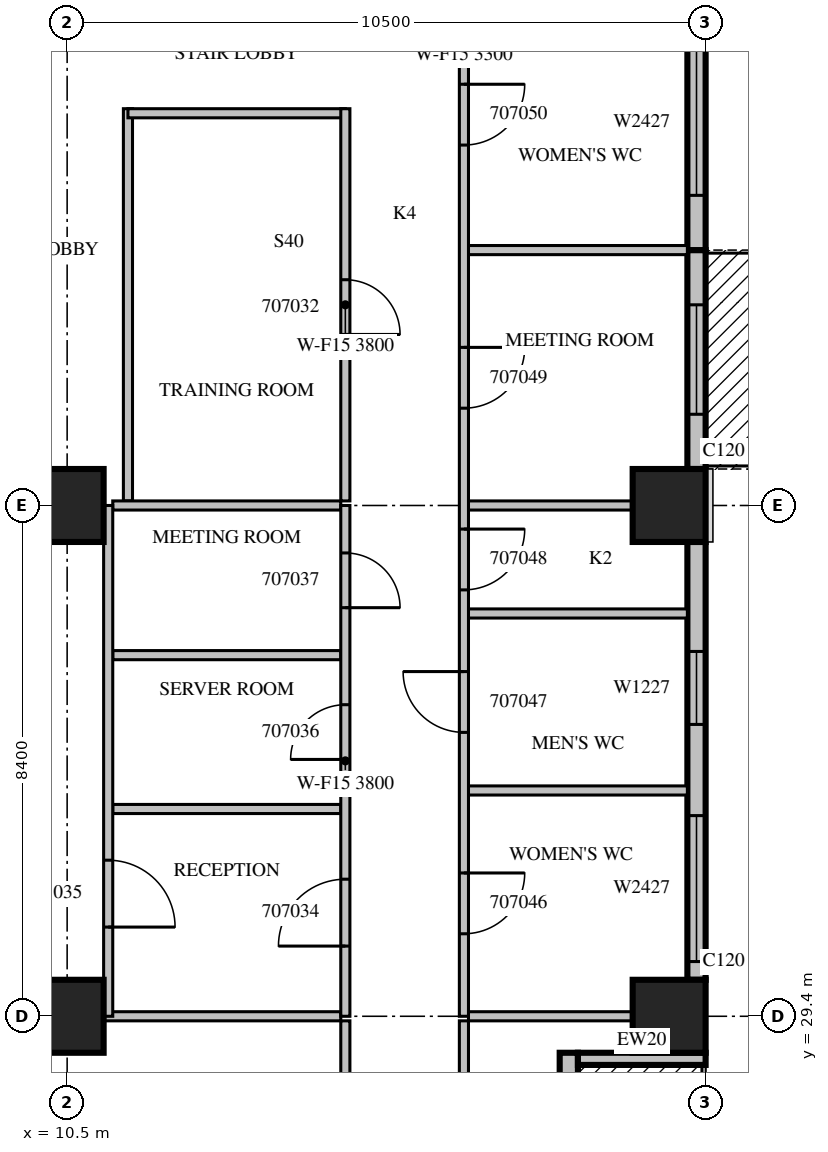
"""IFC4 building model, lengths in metres.
Left out: names, types, materials, properties, quantities, classifications, styles, units other than length and angle.
Written with IfcOpenShell. Run it as: python <this file> out.ifc"""

import sys

from ifc_helpers import new_model, si_unit, direction, frame, frame_2d, origin, origin_2d, place, context, subcontext, project, spatial, rectangle, extrude, source, transform, mapped, element, fill, save


model = new_model("IFC4")
c1 = context("Model", 3, precision=1e-05, world=origin(), true_north=direction((0.0, 1.0)))
c2 = subcontext(c1, "Body", "Model", "MODEL_VIEW")
j1 = project(units=[si_unit("LENGTHUNIT", "METRE"), si_unit("PLANEANGLEUNIT", "RADIAN")], contexts=[c1])
p1 = place(None, origin())
s1 = spatial("IfcSite", under=j1, at=p1, CompositionType="ELEMENT")
p2 = place(p1, origin())
s2 = spatial("IfcBuilding", under=s1, at=p2, CompositionType="ELEMENT")
p3 = place(p2, frame((0.0, 0.0, 40.5)))
s3 = spatial("IfcBuildingStorey", under=s2, at=p3, CompositionType="ELEMENT", Elevation=40.5)
m1 = source(origin(), c2, "Body", "SweptSolid", [
    extrude(rectangle(XDim=1.2, YDim=1.2, at=origin_2d()), origin(), (0.0, 0.0, 1.0), 4.2),
])
for number, where, z_axis, x_axis in (
    (1, (10.5, 29.4, 0.0), (0.0, 0.0, 1.0), (1.0, 0.0, 0.0)),
    (2, (20.4, 29.4, 0.0), (0.0, 0.0, 1.0), (1.0, 0.0, 0.0)),
    (3, (10.5, 37.8, 0.0), (0.0, 0.0, 1.0), (1.0, 0.0, 0.0)),
    (4, (20.4, 37.8, 0.0), (0.0, 0.0, 1.0), (1.0, 0.0, 0.0)),
):
    element("IfcColumn", number, at=place(p3, frame(where, z_axis=z_axis, x_axis=x_axis)), inside=s3, PredefinedType="COLUMN", context=c2, shape_type="MappedRepresentation", body=[
        mapped(m1, transform((0.0, 0.0, 0.0), scale=1.0)),
    ])
m2 = source(origin(), c2, "Body", "SweptSolid", [
    extrude(rectangle(XDim=3.6, YDim=0.3, at=frame_2d((1.8, 0.0))), origin(), (0.0, 0.0, 1.0), 3.8),
])
p4 = place(p3, frame((18.75, 25.2, 0.0), z_axis=(0.0, 0.0, 1.0), x_axis=(0.0, 1.0, 0.0)))
e5 = element("IfcWall", 5, at=p4, inside=s3, PredefinedType="STANDARD", context=c2, shape_type="MappedRepresentation", body=[
    mapped(m2, transform((0.0, 0.0, 0.0), scale=1.0)),
])
m3 = source(origin(), c2, "Body", "SweptSolid", [
    extrude(rectangle(XDim=1.8, YDim=2.4, at=frame_2d((0.9, 1.2))), frame((0.0, 0.16, 0.0), z_axis=(0.0, -1.0, 0.0), x_axis=(1.0, 0.0, 0.0)), (0.0, 0.0, 1.0), 0.32),
])
p5 = place(p4, frame((0.9, 0.0, 0.0)))
e6 = element("IfcOpeningElement", 6, at=p5, cuts=e5, PredefinedType="OPENING", context=c2, shape_type="MappedRepresentation", body=[
    mapped(m3, transform((0.0, 0.0, 0.0), scale=1.0)),
])
m4 = source(origin(), c2, "Body", "SweptSolid", [
    extrude(rectangle(XDim=2.1, YDim=0.2, at=frame_2d((1.05, 0.0))), origin(), (0.0, 0.0, 1.0), 3.8),
])
p6 = place(p3, frame((21.0, 28.7, 0.0), z_axis=(0.0, 0.0, 1.0), x_axis=(-1.0, 0.0, 0.0)))
e7 = element("IfcWall", 7, at=p6, inside=s3, PredefinedType="STANDARD", context=c2, shape_type="MappedRepresentation", body=[
    mapped(m4, transform((0.0, 0.0, 0.0), scale=1.0)),
])
m5 = source(origin(), c2, "Body", "SweptSolid", [
    extrude(rectangle(XDim=7.2, YDim=0.3, at=frame_2d((3.6, 0.0))), origin(), (0.0, 0.0, 1.0), 3.8),
])
p7 = place(p3, frame((20.85, 30.0, 0.0), z_axis=(0.0, 0.0, 1.0), x_axis=(0.0, 1.0, 0.0)))
e8 = element("IfcWall", 8, at=p7, inside=s3, PredefinedType="STANDARD", context=c2, shape_type="MappedRepresentation", body=[
    mapped(m5, transform((0.0, 0.0, 0.0), scale=1.0)),
])
m6 = source(origin(), c2, "Body", "SweptSolid", [
    extrude(rectangle(XDim=2.4, YDim=2.7, at=frame_2d((1.2, 1.35))), frame((0.0, 0.16, 0.0), z_axis=(0.0, -1.0, 0.0), x_axis=(1.0, 0.0, 0.0)), (0.0, 0.0, 1.0), 0.32),
])
p8 = place(p7, frame((0.3, 0.0, 0.6)))
e9 = element("IfcOpeningElement", 9, at=p8, cuts=e8, PredefinedType="OPENING", context=c2, shape_type="MappedRepresentation", body=[
    mapped(m6, transform((0.0, 0.0, 0.0), scale=1.0)),
])
m7 = source(origin(), c2, "Body", "SweptSolid", [
    extrude(rectangle(XDim=1.2, YDim=2.7, at=frame_2d((0.6, 1.35))), frame((0.0, 0.16, 0.0), z_axis=(0.0, -1.0, 0.0), x_axis=(1.0, 0.0, 0.0)), (0.0, 0.0, 1.0), 0.32),
])
p9 = place(p7, frame((4.199, 0.0, 0.6)))
e10 = element("IfcOpeningElement", 10, at=p9, cuts=e8, PredefinedType="OPENING", context=c2, shape_type="MappedRepresentation", body=[
    mapped(m7, transform((0.0, 0.0, 0.0), scale=1.0)),
])
p10 = place(p3, frame((20.85, 38.4, 0.0), z_axis=(0.0, 0.0, 1.0), x_axis=(0.0, 1.0, 0.0)))
e11 = element("IfcWall", 11, at=p10, inside=s3, PredefinedType="STANDARD", context=c2, shape_type="MappedRepresentation", body=[
    mapped(m2, transform((0.0, 0.0, 0.0), scale=1.0)),
])
p11 = place(p10, frame((0.9, 0.0, 0.0)))
e12 = element("IfcOpeningElement", 12, at=p11, cuts=e11, PredefinedType="OPENING", context=c2, shape_type="MappedRepresentation", body=[
    mapped(m3, transform((0.0, 0.0, 0.0), scale=1.0)),
])
p12 = place(p3, frame((20.85, 42.0, 0.0), z_axis=(0.0, 0.0, 1.0), x_axis=(0.0, 1.0, 0.0)))
e13 = element("IfcWall", 13, at=p12, inside=s3, PredefinedType="STANDARD", context=c2, shape_type="MappedRepresentation", body=[
    mapped(m2, transform((0.0, 0.0, 0.0), scale=1.0)),
])
p13 = place(p12, frame((0.9, 0.0, 0.6)))
e14 = element("IfcOpeningElement", 14, at=p13, cuts=e13, PredefinedType="OPENING", context=c2, shape_type="MappedRepresentation", body=[
    mapped(m6, transform((0.0, 0.0, 0.0), scale=1.0)),
])
m8 = source(origin(), c2, "Body", "SweptSolid", [
    extrude(rectangle(XDim=5.15, YDim=0.15, at=frame_2d((2.575, 0.0))), origin(), (0.0, 0.0, 1.0), 3.8),
])
for number, where, z_axis, x_axis in (
    (15, (15.075, 24.175, 0.0), (0.0, 0.0, 1.0), (0.0, 1.0, 0.0)),
    (16, (17.025, 29.325, 0.0), (0.0, 0.0, 1.0), (0.0, -1.0, 0.0)),
):
    element("IfcWall", number, at=place(p3, frame(where, z_axis=z_axis, x_axis=x_axis)), inside=s3, PredefinedType="PARTITIONING", context=c2, shape_type="MappedRepresentation", body=[
        mapped(m8, transform((0.0, 0.0, 0.0), scale=1.0)),
    ])
m9 = source(origin(), c2, "Body", "SweptSolid", [
    extrude(rectangle(XDim=3.901, YDim=0.15, at=frame_2d((1.95, 0.0))), origin(), (0.0, 0.0, 1.0), 3.8),
])
p14 = place(p3, frame((15.0, 29.4, 0.0), z_axis=(0.0, 0.0, 1.0), x_axis=(-1.0, 0.0, 0.0)))
e17 = element("IfcWall", 17, at=p14, inside=s3, PredefinedType="PARTITIONING", context=c2, shape_type="MappedRepresentation", body=[
    mapped(m9, transform((0.0, 0.0, 0.0), scale=1.0)),
])
m10 = source(origin(), c2, "Body", "SweptSolid", [
    extrude(rectangle(XDim=2.701, YDim=0.15, at=frame_2d((1.351, 0.0))), origin(), (0.0, 0.0, 1.0), 3.8),
])
p15 = place(p3, frame((19.801, 29.4, 0.0), z_axis=(0.0, 0.0, 1.0), x_axis=(-1.0, 0.0, 0.0)))
e18 = element("IfcWall", 18, at=p15, inside=s3, PredefinedType="PARTITIONING", context=c2, shape_type="MappedRepresentation", body=[
    mapped(m10, transform((0.0, 0.0, 0.0), scale=1.0)),
])
m11 = source(origin(), c2, "Body", "SweptSolid", [
    extrude(rectangle(XDim=6.45, YDim=0.15, at=frame_2d((3.225, 0.0))), origin(), (0.0, 0.0, 1.0), 3.8),
])
p16 = place(p3, frame((11.5, 44.325, 0.0), z_axis=(0.0, 0.0, 1.0), x_axis=(0.0, -1.0, 0.0)))
e19 = element("IfcWall", 19, at=p16, inside=s3, PredefinedType="PARTITIONING", context=c2, shape_type="MappedRepresentation", body=[
    mapped(m11, transform((0.0, 0.0, 0.0), scale=1.0)),
])
p17 = place(p3, frame((15.075, 44.25, 0.0), z_axis=(0.0, 0.0, 1.0), x_axis=(-1.0, 0.0, 0.0)))
e20 = element("IfcWall", 20, at=p17, inside=s3, PredefinedType="PARTITIONING", context=c2, shape_type="SweptSolid", body=[
    extrude(rectangle(XDim=3.575, YDim=0.15, at=frame_2d((1.788, 0.0))), origin(), (0.0, 0.0, 1.0), 3.8),
])
p18 = place(p3, frame((15.075, 37.875, 0.0), z_axis=(0.0, 0.0, 1.0), x_axis=(0.0, 1.0, 0.0)))
e21 = element("IfcWall", 21, at=p18, inside=s3, PredefinedType="PARTITIONING", context=c2, shape_type="MappedRepresentation", body=[
    mapped(m11, transform((0.0, 0.0, 0.0), scale=1.0)),
])
m12 = source(origin(), c2, "Body", "SweptSolid", [
    extrude(rectangle(XDim=0.9, YDim=2.1, at=frame_2d((0.45, 1.05))), frame((0.0, 0.085, 0.0), z_axis=(0.0, -1.0, 0.0), x_axis=(1.0, 0.0, 0.0)), (0.0, 0.0, 1.0), 0.17),
])
p19 = place(p18, frame((2.737, 0.0, 0.0)))
e22 = element("IfcOpeningElement", 22, at=p19, cuts=e21, PredefinedType="OPENING", context=c2, shape_type="MappedRepresentation", body=[
    mapped(m12, transform((0.0, 0.0, 0.0), scale=1.0)),
])
m13 = source(origin(), c2, "Body", "SweptSolid", [
    extrude(rectangle(XDim=3.75, YDim=0.15, at=frame_2d((1.875, 0.0))), origin(), (0.0, 0.0, 1.0), 3.8),
])
for number, where, z_axis, x_axis in (
    (23, (15.0, 32.809, 0.0), (0.0, 0.0, 1.0), (-1.0, 0.0, 0.0)),
    (24, (15.0, 35.339, 0.0), (0.0, 0.0, 1.0), (-1.0, 0.0, 0.0)),
    (25, (15.0, 37.8, 0.0), (0.0, 0.0, 1.0), (-1.0, 0.0, 0.0)),
):
    element("IfcWall", number, at=place(p3, frame(where, z_axis=z_axis, x_axis=x_axis)), inside=s3, PredefinedType="PARTITIONING", context=c2, shape_type="MappedRepresentation", body=[
        mapped(m13, transform((0.0, 0.0, 0.0), scale=1.0)),
    ])
m14 = source(origin(), c2, "Body", "SweptSolid", [
    extrude(rectangle(XDim=8.4, YDim=0.15, at=frame_2d((4.2, 0.0))), origin(), (0.0, 0.0, 1.0), 3.8),
])
p20 = place(p3, frame((11.175, 29.4, 0.0), z_axis=(0.0, 0.0, 1.0), x_axis=(0.0, 1.0, 0.0)))
e26 = element("IfcWall", 26, at=p20, inside=s3, PredefinedType="PARTITIONING", context=c2, shape_type="MappedRepresentation", body=[
    mapped(m14, transform((0.0, 0.0, 0.0), scale=1.0)),
])
m15 = source(origin(), c2, "Body", "SweptSolid", [
    extrude(rectangle(XDim=1.1, YDim=2.1, at=frame_2d((0.55, 1.05))), frame((0.0, 0.085, 0.0), z_axis=(0.0, -1.0, 0.0), x_axis=(1.0, 0.0, 0.0)), (0.0, 0.0, 1.0), 0.17),
])
p21 = place(p20, frame((1.467, 0.0, 0.0)))
e27 = element("IfcOpeningElement", 27, at=p21, cuts=e26, PredefinedType="OPENING", context=c2, shape_type="MappedRepresentation", body=[
    mapped(m15, transform((0.0, 0.0, 0.0), scale=1.0)),
])
m16 = source(origin(), c2, "Body", "SweptSolid", [
    extrude(rectangle(XDim=3.6, YDim=0.15, at=frame_2d((1.8, 0.0))), origin(), (0.0, 0.0, 1.0), 3.8),
])
for number, where, z_axis, x_axis in (
    (28, (17.1, 33.113, 0.0), (0.0, 0.0, 1.0), (1.0, 0.0, 0.0)),
    (29, (17.1, 36.024, 0.0), (0.0, 0.0, 1.0), (1.0, 0.0, 0.0)),
):
    element("IfcWall", number, at=place(p3, frame(where, z_axis=z_axis, x_axis=x_axis)), inside=s3, PredefinedType="PARTITIONING", context=c2, shape_type="MappedRepresentation", body=[
        mapped(m16, transform((0.0, 0.0, 0.0), scale=1.0)),
    ])
p22 = place(p3, frame((19.801, 37.8, 0.0), z_axis=(0.0, 0.0, 1.0), x_axis=(-1.0, 0.0, 0.0)))
e30 = element("IfcWall", 30, at=p22, inside=s3, PredefinedType="PARTITIONING", context=c2, shape_type="MappedRepresentation", body=[
    mapped(m10, transform((0.0, 0.0, 0.0), scale=1.0)),
])
p23 = place(p3, frame((20.7, 42.0, 0.0), z_axis=(0.0, 0.0, 1.0), x_axis=(-1.0, 0.0, 0.0)))
e31 = element("IfcWall", 31, at=p23, inside=s3, PredefinedType="PARTITIONING", context=c2, shape_type="MappedRepresentation", body=[
    mapped(m16, transform((0.0, 0.0, 0.0), scale=1.0)),
])
p24 = place(p3, frame((15.075, 29.4, 0.0), z_axis=(0.0, 0.0, 1.0), x_axis=(0.0, 1.0, 0.0)))
e32 = element("IfcWall", 32, at=p24, inside=s3, PredefinedType="PARTITIONING", context=c2, shape_type="MappedRepresentation", body=[
    mapped(m14, transform((0.0, 0.0, 0.0), scale=1.0)),
])
p25 = place(p24, frame((1.154, 0.0, 0.0)))
e33 = element("IfcOpeningElement", 33, at=p25, cuts=e32, PredefinedType="OPENING", context=c2, shape_type="MappedRepresentation", body=[
    mapped(m15, transform((0.0, 0.0, 0.0), scale=1.0)),
])
p26 = place(p24, frame((4.224, 0.0, 0.0)))
e34 = element("IfcOpeningElement", 34, at=p26, cuts=e32, PredefinedType="OPENING", context=c2, shape_type="MappedRepresentation", body=[
    mapped(m12, transform((0.0, 0.0, 0.0), scale=1.0)),
])
p27 = place(p24, frame((6.719, 0.0, 0.0)))
e35 = element("IfcOpeningElement", 35, at=p27, cuts=e32, PredefinedType="OPENING", context=c2, shape_type="MappedRepresentation", body=[
    mapped(m12, transform((0.0, 0.0, 0.0), scale=1.0)),
])
p28 = place(p3, frame((17.025, 61.02, 0.0), z_axis=(0.0, 0.0, 1.0), x_axis=(0.0, -1.0, 0.0)))
e36 = element("IfcWall", 36, at=p28, inside=s3, PredefinedType="PARTITIONING", context=c2, shape_type="SweptSolid", body=[
    extrude(rectangle(XDim=31.62, YDim=0.15, at=frame_2d((15.81, 0.0))), origin(), (0.0, 0.0, 1.0), 3.3),
])
m17 = source(origin(), c2, "Body", "SweptSolid", [
    extrude(rectangle(XDim=1.0, YDim=2.1, at=frame_2d((0.5, 1.05))), frame((0.0, 0.085, 0.0), z_axis=(0.0, -1.0, 0.0), x_axis=(1.0, 0.0, 0.0)), (0.0, 0.0, 1.0), 0.17),
])
p29 = place(p28, frame((29.263, 0.0, 0.0)))
e37 = element("IfcOpeningElement", 37, at=p29, cuts=e36, PredefinedType="OPENING", context=c2, shape_type="MappedRepresentation", body=[
    mapped(m17, transform((0.0, 0.0, 0.0), scale=1.0)),
])
p30 = place(p28, frame((25.951, 0.0, 0.0)))
e38 = element("IfcOpeningElement", 38, at=p30, cuts=e36, PredefinedType="OPENING", context=c2, shape_type="MappedRepresentation", body=[
    mapped(m17, transform((0.0, 0.0, 0.0), scale=1.0)),
])
p31 = place(p28, frame((23.608, 0.0, 0.0)))
e39 = element("IfcOpeningElement", 39, at=p31, cuts=e36, PredefinedType="OPENING", context=c2, shape_type="MappedRepresentation", body=[
    mapped(m17, transform((0.0, 0.0, 0.0), scale=1.0)),
])
p32 = place(p28, frame((20.62, 0.0, 0.0)))
e40 = element("IfcOpeningElement", 40, at=p32, cuts=e36, PredefinedType="OPENING", context=c2, shape_type="MappedRepresentation", body=[
    mapped(m17, transform((0.0, 0.0, 0.0), scale=1.0)),
])
p33 = place(p28, frame((16.293, 0.0, 0.0)))
e41 = element("IfcOpeningElement", 41, at=p33, cuts=e36, PredefinedType="OPENING", context=c2, shape_type="MappedRepresentation", body=[
    mapped(m17, transform((0.0, 0.0, 0.0), scale=1.0)),
])
p34 = place(p28, frame((12.314, 0.0, 0.0)))
e42 = element("IfcOpeningElement", 42, at=p34, cuts=e36, PredefinedType="OPENING", context=c2, shape_type="MappedRepresentation", body=[
    mapped(m17, transform((0.0, 0.0, 0.0), scale=1.0)),
])
p35 = place(p28, frame((9.501, 0.0, 0.0)))
e43 = element("IfcOpeningElement", 43, at=p35, cuts=e36, PredefinedType="OPENING", context=c2, shape_type="MappedRepresentation", body=[
    mapped(m17, transform((0.0, 0.0, 0.0), scale=1.0)),
])
p36 = place(p28, frame((6.186, 0.0, 0.0)))
e44 = element("IfcOpeningElement", 44, at=p36, cuts=e36, PredefinedType="OPENING", context=c2, shape_type="MappedRepresentation", body=[
    mapped(m17, transform((0.0, 0.0, 0.0), scale=1.0)),
])
p37 = place(p28, frame((1.679, 0.0, 0.0)))
e45 = element("IfcOpeningElement", 45, at=p37, cuts=e36, PredefinedType="OPENING", context=c2, shape_type="MappedRepresentation", body=[
    mapped(m17, transform((0.0, 0.0, 0.0), scale=1.0)),
])
m18 = source(origin(), c2, "Body", "SweptSolid", [
    extrude(rectangle(XDim=2.4, YDim=2.7, at=frame_2d((1.2, 1.35))), frame((0.0, 0.03, 0.0), z_axis=(0.0, -1.0, 0.0), x_axis=(1.0, 0.0, 0.0)), (0.0, 0.0, 1.0), 0.06),
])
p38 = place(p8, origin())
e46 = element("IfcWindow", 46, at=p38, inside=s3, PartitioningType="SINGLE_PANEL", PredefinedType="WINDOW", context=c2, shape_type="MappedRepresentation", body=[
    mapped(m18, transform((0.0, 0.0, 0.0), scale=1.0)),
])
fill(e9, e46)
m19 = source(origin(), c2, "Body", "SweptSolid", [
    extrude(rectangle(XDim=1.2, YDim=2.7, at=frame_2d((0.6, 1.35))), frame((0.0, 0.03, 0.0), z_axis=(0.0, -1.0, 0.0), x_axis=(1.0, 0.0, 0.0)), (0.0, 0.0, 1.0), 0.06),
])
p39 = place(p9, origin())
e47 = element("IfcWindow", 47, at=p39, inside=s3, PartitioningType="SINGLE_PANEL", PredefinedType="WINDOW", context=c2, shape_type="MappedRepresentation", body=[
    mapped(m19, transform((0.0, 0.0, 0.0), scale=1.0)),
])
fill(e10, e47)
m20 = source(origin(), c2, "Body", "SweptSolid", [
    extrude(rectangle(XDim=1.8, YDim=2.4, at=frame_2d((0.9, 1.2))), frame((0.0, 0.025, 0.0), z_axis=(0.0, -1.0, 0.0), x_axis=(1.0, 0.0, 0.0)), (0.0, 0.0, 1.0), 0.05),
])
p40 = place(p11, origin())
e48 = element("IfcDoor", 48, at=p40, inside=s3, OperationType="SLIDING_TO_LEFT", PredefinedType="DOOR", context=c2, shape_type="MappedRepresentation", body=[
    mapped(m20, transform((0.0, 0.0, 0.0), scale=1.0)),
])
fill(e12, e48)
p41 = place(p13, origin())
e49 = element("IfcWindow", 49, at=p41, inside=s3, PartitioningType="SINGLE_PANEL", PredefinedType="WINDOW", context=c2, shape_type="MappedRepresentation", body=[
    mapped(m18, transform((0.0, 0.0, 0.0), scale=1.0)),
])
fill(e14, e49)
m21 = source(origin(), c2, "Body", "SweptSolid", [
    extrude(rectangle(XDim=0.9, YDim=2.1, at=frame_2d((0.45, 1.05))), frame((0.0, 0.025, 0.0), z_axis=(0.0, -1.0, 0.0), x_axis=(1.0, 0.0, 0.0)), (0.0, 0.0, 1.0), 0.05),
])
p42 = place(p19, origin())
e50 = element("IfcDoor", 50, at=p42, inside=s3, OperationType="SINGLE_SWING_RIGHT", PredefinedType="DOOR", context=c2, shape_type="MappedRepresentation", body=[
    mapped(m21, transform((0.0, 0.0, 0.0), scale=1.0)),
])
fill(e22, e50)
m22 = source(origin(), c2, "Body", "SweptSolid", [
    extrude(rectangle(XDim=1.1, YDim=2.1, at=frame_2d((0.55, 1.05))), frame((0.0, 0.025, 0.0), z_axis=(0.0, -1.0, 0.0), x_axis=(1.0, 0.0, 0.0)), (0.0, 0.0, 1.0), 0.05),
])
p43 = place(p25, origin())
e51 = element("IfcDoor", 51, at=p43, inside=s3, OperationType="SINGLE_SWING_LEFT", PredefinedType="DOOR", context=c2, shape_type="MappedRepresentation", body=[
    mapped(m22, transform((0.0, 0.0, 0.0), scale=1.0)),
])
fill(e33, e51)
p44 = place(p21, origin())
e52 = element("IfcDoor", 52, at=p44, inside=s3, OperationType="SINGLE_SWING_RIGHT", PredefinedType="DOOR", context=c2, shape_type="MappedRepresentation", body=[
    mapped(m22, transform((0.0, 0.0, 0.0), scale=1.0)),
])
fill(e27, e52)
p45 = place(p26, origin())
e53 = element("IfcDoor", 53, at=p45, inside=s3, OperationType="SINGLE_SWING_LEFT", PredefinedType="DOOR", context=c2, shape_type="MappedRepresentation", body=[
    mapped(m21, transform((0.0, 0.0, 0.0), scale=1.0)),
])
fill(e34, e53)
p46 = place(p27, origin())
e54 = element("IfcDoor", 54, at=p46, inside=s3, OperationType="SINGLE_SWING_RIGHT", PredefinedType="DOOR", context=c2, shape_type="MappedRepresentation", body=[
    mapped(m21, transform((0.0, 0.0, 0.0), scale=1.0)),
])
fill(e35, e54)
m23 = source(origin(), c2, "Body", "SweptSolid", [
    extrude(rectangle(XDim=1.0, YDim=2.1, at=frame_2d((0.5, 1.05))), frame((0.0, 0.025, 0.0), z_axis=(0.0, -1.0, 0.0), x_axis=(1.0, 0.0, 0.0)), (0.0, 0.0, 1.0), 0.05),
])
p47 = place(p29, origin())
e55 = element("IfcDoor", 55, at=p47, inside=s3, OperationType="SINGLE_SWING_LEFT", PredefinedType="DOOR", context=c2, shape_type="MappedRepresentation", body=[
    mapped(m23, transform((0.0, 0.0, 0.0), scale=1.0)),
])
fill(e37, e55)
p48 = place(p30, origin())
e56 = element("IfcDoor", 56, at=p48, inside=s3, OperationType="SINGLE_SWING_RIGHT", PredefinedType="DOOR", context=c2, shape_type="MappedRepresentation", body=[
    mapped(m23, transform((0.0, 0.0, 0.0), scale=1.0)),
])
fill(e38, e56)
p49 = place(p31, origin())
e57 = element("IfcDoor", 57, at=p49, inside=s3, OperationType="SINGLE_SWING_LEFT", PredefinedType="DOOR", context=c2, shape_type="MappedRepresentation", body=[
    mapped(m23, transform((0.0, 0.0, 0.0), scale=1.0)),
])
fill(e39, e57)
p50 = place(p32, origin())
e58 = element("IfcDoor", 58, at=p50, inside=s3, OperationType="SINGLE_SWING_LEFT", PredefinedType="DOOR", context=c2, shape_type="MappedRepresentation", body=[
    mapped(m23, transform((0.0, 0.0, 0.0), scale=1.0)),
])
fill(e40, e58)
p51 = place(p33, origin())
e59 = element("IfcDoor", 59, at=p51, inside=s3, OperationType="SINGLE_SWING_LEFT", PredefinedType="DOOR", context=c2, shape_type="MappedRepresentation", body=[
    mapped(m23, transform((0.0, 0.0, 0.0), scale=1.0)),
])
fill(e41, e59)
save(model, sys.argv[1])
